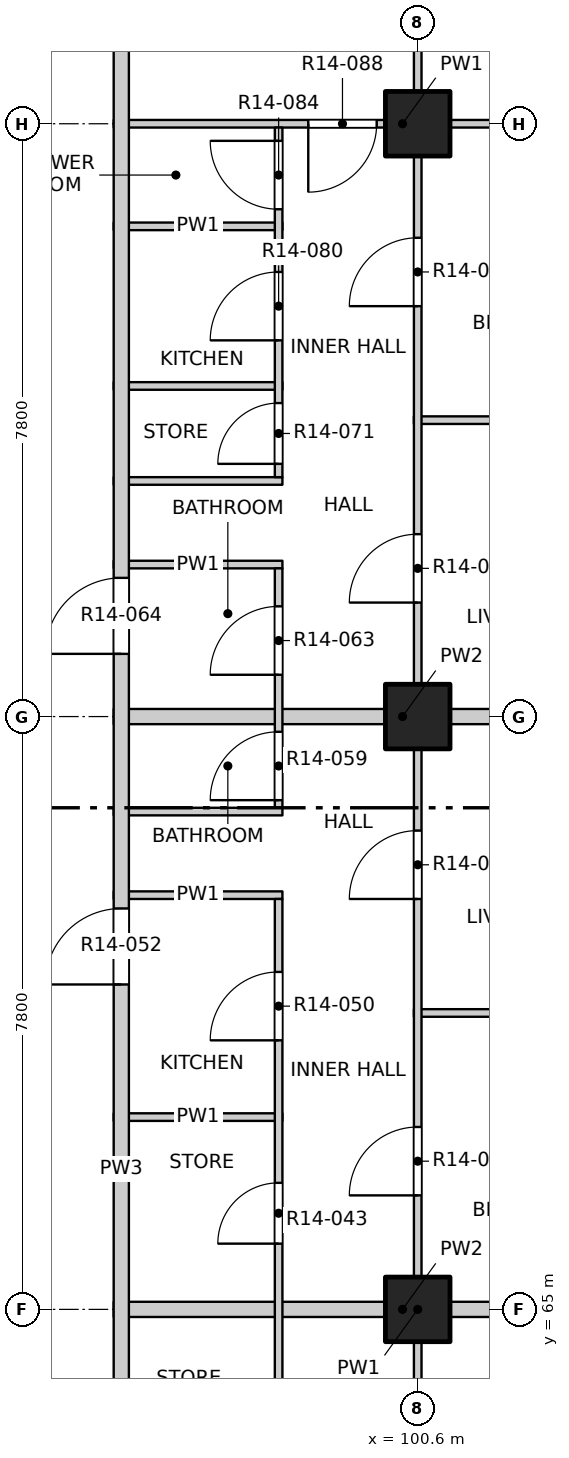
"""IFC4 building model, lengths in metres.
Left out: names, types, materials, properties, quantities, classifications, styles, units other than length and angle.
Written with IfcOpenShell. Run it as: python <this file> out.ifc"""

import sys

from ifc_helpers import new_model, si_unit, direction, frame, frame_2d, origin, origin_2d, place, context, subcontext, project, spatial, rectangle, extrude, element, fill, save


model = new_model("IFC4")
c1 = context("Model", 3, precision=1e-05, world=origin(), true_north=direction((0.0, 1.0)))
c2 = subcontext(c1, "Body", "Model", "MODEL_VIEW")
j1 = project(units=[si_unit("LENGTHUNIT", "METRE"), si_unit("PLANEANGLEUNIT", "RADIAN")], contexts=[c1])
p1 = place(None, origin())
s1 = spatial("IfcSite", under=j1, at=p1, CompositionType="ELEMENT")
p2 = place(p1, origin())
s2 = spatial("IfcBuilding", under=s1, at=p2, CompositionType="ELEMENT")
p3 = place(p2, frame((0.0, 0.0, 155.4)))
s3 = spatial("IfcBuildingStorey", under=s2, at=p3, CompositionType="ELEMENT", Elevation=155.4)
for number, where, z_axis, x_axis in (
    (1, (100.6, 65.0, -0.25), (0.0, 0.0, 1.0), (1.0, 0.0, 0.0)),
    (2, (100.6, 72.8, -0.25), (0.0, 0.0, 1.0), (1.0, 0.0, 0.0)),
    (3, (100.6, 80.6, -0.25), (0.0, 0.0, 1.0), (1.0, 0.0, 0.0)),
):
    element("IfcColumn", number, at=place(p3, frame(where, z_axis=z_axis, x_axis=x_axis)), inside=s3, PredefinedType="COLUMN", context=c2, shape_type="SweptSolid", body=[
        extrude(rectangle(XDim=0.85, YDim=0.85, at=origin_2d()), origin(), (0.0, 0.0, 1.0), 3.4),
    ])
p4 = place(p3, frame((96.6, 65.0, 0.0), z_axis=(0.0, 0.0, 1.0), x_axis=(1.0, 0.0, 0.0)))
e4 = element("IfcWall", 4, at=p4, inside=s3, PredefinedType="PARTITIONING", context=c2, shape_type="SweptSolid", body=[
    extrude(rectangle(XDim=7.6, YDim=0.2, at=frame_2d((3.8, 0.0))), origin(), (0.0, 0.0, 1.0), 3.15),
])
p5 = place(p3, frame((96.6, 67.53, 0.0), z_axis=(0.0, 0.0, 1.0), x_axis=(1.0, 0.0, 0.0)))
e5 = element("IfcWall", 5, at=p5, inside=s3, PredefinedType="PARTITIONING", context=c2, shape_type="SweptSolid", body=[
    extrude(rectangle(XDim=2.22, YDim=0.1, at=frame_2d((1.11, 0.0))), origin(), (0.0, 0.0, 1.0), 3.15),
])
p6 = place(p3, frame((100.55, 68.9, 0.0), z_axis=(0.0, 0.0, 1.0), x_axis=(1.0, 0.0, 0.0)))
e6 = element("IfcWall", 6, at=p6, inside=s3, PredefinedType="PARTITIONING", context=c2, shape_type="SweptSolid", body=[
    extrude(rectangle(XDim=3.65, YDim=0.1, at=frame_2d((1.825, 0.0))), origin(), (0.0, 0.0, 1.0), 2.55),
])
for number, where, z_axis, x_axis in (
    (7, (96.6, 70.45, 0.0), (0.0, 0.0, 1.0), (1.0, 0.0, 0.0)),
    (8, (96.6, 71.55, 0.0), (0.0, 0.0, 1.0), (1.0, 0.0, 0.0)),
):
    element("IfcWall", number, at=place(p3, frame(where, z_axis=z_axis, x_axis=x_axis)), inside=s3, PredefinedType="PARTITIONING", context=c2, shape_type="SweptSolid", body=[
        extrude(rectangle(XDim=2.22, YDim=0.1, at=frame_2d((1.11, 0.0))), origin(), (0.0, 0.0, 1.0), 3.15),
    ])
p7 = place(p3, frame((96.6, 72.8, 0.0), z_axis=(0.0, 0.0, 1.0), x_axis=(1.0, 0.0, 0.0)))
e9 = element("IfcWall", 9, at=p7, inside=s3, PredefinedType="PARTITIONING", context=c2, shape_type="SweptSolid", body=[
    extrude(rectangle(XDim=7.6, YDim=0.2, at=frame_2d((3.8, 0.0))), origin(), (0.0, 0.0, 1.0), 3.15),
])
for number, where, z_axis, x_axis in (
    (10, (96.6, 74.8, 0.0), (0.0, 0.0, 1.0), (1.0, 0.0, 0.0)),
    (11, (96.6, 75.9, 0.0), (0.0, 0.0, 1.0), (1.0, 0.0, 0.0)),
):
    element("IfcWall", number, at=place(p3, frame(where, z_axis=z_axis, x_axis=x_axis)), inside=s3, PredefinedType="PARTITIONING", context=c2, shape_type="SweptSolid", body=[
        extrude(rectangle(XDim=2.22, YDim=0.1, at=frame_2d((1.11, 0.0))), origin(), (0.0, 0.0, 1.0), 3.15),
    ])
p8 = place(p3, frame((100.55, 76.7, 0.0), z_axis=(0.0, 0.0, 1.0), x_axis=(1.0, 0.0, 0.0)))
e12 = element("IfcWall", 12, at=p8, inside=s3, PredefinedType="PARTITIONING", context=c2, shape_type="SweptSolid", body=[
    extrude(rectangle(XDim=3.65, YDim=0.1, at=frame_2d((1.825, 0.0))), origin(), (0.0, 0.0, 1.0), 2.55),
])
for number, where, z_axis, x_axis in (
    (13, (96.6, 77.15, 0.0), (0.0, 0.0, 1.0), (1.0, 0.0, 0.0)),
    (14, (96.6, 79.25, 0.0), (0.0, 0.0, 1.0), (1.0, 0.0, 0.0)),
):
    element("IfcWall", number, at=place(p3, frame(where, z_axis=z_axis, x_axis=x_axis)), inside=s3, PredefinedType="PARTITIONING", context=c2, shape_type="SweptSolid", body=[
        extrude(rectangle(XDim=2.22, YDim=0.1, at=frame_2d((1.11, 0.0))), origin(), (0.0, 0.0, 1.0), 3.15),
    ])
p9 = place(p3, frame((96.6, 80.6, 0.0), z_axis=(0.0, 0.0, 1.0), x_axis=(1.0, 0.0, 0.0)))
e15 = element("IfcWall", 15, at=p9, inside=s3, PredefinedType="PARTITIONING", context=c2, shape_type="SweptSolid", body=[
    extrude(rectangle(XDim=7.6, YDim=0.1, at=frame_2d((3.8, 0.0))), origin(), (0.0, 0.0, 1.0), 3.15),
])
p10 = place(p9, frame((2.56, 0.0, 0.0)))
e16 = element("IfcOpeningElement", 16, at=p10, cuts=e15, PredefinedType="OPENING", context=c2, shape_type="SweptSolid", body=[
    extrude(rectangle(XDim=0.9, YDim=2.1, at=frame_2d((0.45, 1.05))), frame((0.0, 0.06, 0.0), z_axis=(0.0, -1.0, 0.0), x_axis=(1.0, 0.0, 0.0)), (0.0, 0.0, 1.0), 0.12),
])
p11 = place(p3, frame((96.7, 49.5, 0.0), z_axis=(0.0, 0.0, 1.0), x_axis=(0.0, 1.0, 0.0)))
e17 = element("IfcWall", 17, at=p11, inside=s3, PredefinedType="PARTITIONING", context=c2, shape_type="SweptSolid", body=[
    extrude(rectangle(XDim=34.7, YDim=0.2, at=frame_2d((17.35, 0.0))), origin(), (0.0, 0.0, 1.0), 3.15),
])
p12 = place(p11, frame((3.225, 0.0, 0.0)))
e18 = element("IfcOpeningElement", 18, at=p12, cuts=e17, PredefinedType="OPENING", context=c2, shape_type="SweptSolid", body=[
    extrude(rectangle(XDim=1.0, YDim=2.1, at=frame_2d((0.5, 1.05))), frame((0.0, 0.11, 0.0), z_axis=(0.0, -1.0, 0.0), x_axis=(1.0, 0.0, 0.0)), (0.0, 0.0, 1.0), 0.22),
])
p13 = place(p11, frame((19.775, 0.0, 0.0)))
e19 = element("IfcOpeningElement", 19, at=p13, cuts=e17, PredefinedType="OPENING", context=c2, shape_type="SweptSolid", body=[
    extrude(rectangle(XDim=1.0, YDim=2.1, at=frame_2d((0.5, 1.05))), frame((0.0, 0.11, 0.0), z_axis=(0.0, -1.0, 0.0), x_axis=(1.0, 0.0, 0.0)), (0.0, 0.0, 1.0), 0.22),
])
p14 = place(p11, frame((24.125, 0.0, 0.0)))
e20 = element("IfcOpeningElement", 20, at=p14, cuts=e17, PredefinedType="OPENING", context=c2, shape_type="SweptSolid", body=[
    extrude(rectangle(XDim=1.0, YDim=2.1, at=frame_2d((0.5, 1.05))), frame((0.0, 0.11, 0.0), z_axis=(0.0, -1.0, 0.0), x_axis=(1.0, 0.0, 0.0)), (0.0, 0.0, 1.0), 0.22),
])
p15 = place(p3, frame((98.77, 55.05, 0.0), z_axis=(0.0, 0.0, 1.0), x_axis=(0.0, 1.0, 0.0)))
e21 = element("IfcWall", 21, at=p15, inside=s3, PredefinedType="PARTITIONING", context=c2, shape_type="SweptSolid", body=[
    extrude(rectangle(XDim=15.35, YDim=0.1, at=frame_2d((7.675, 0.0))), origin(), (0.0, 0.0, 1.0), 3.15),
])
p16 = place(p15, frame((1.035, 0.0, 0.0)))
e22 = element("IfcOpeningElement", 22, at=p16, cuts=e21, PredefinedType="OPENING", context=c2, shape_type="SweptSolid", body=[
    extrude(rectangle(XDim=0.9, YDim=2.1, at=frame_2d((0.45, 1.05))), frame((0.0, 0.06, 0.0), z_axis=(0.0, -1.0, 0.0), x_axis=(1.0, 0.0, 0.0)), (0.0, 0.0, 1.0), 0.12),
])
p17 = place(p15, frame((3.47, 0.0, 0.0)))
e23 = element("IfcOpeningElement", 23, at=p17, cuts=e21, PredefinedType="OPENING", context=c2, shape_type="SweptSolid", body=[
    extrude(rectangle(XDim=0.9, YDim=2.1, at=frame_2d((0.45, 1.05))), frame((0.0, 0.06, 0.0), z_axis=(0.0, -1.0, 0.0), x_axis=(1.0, 0.0, 0.0)), (0.0, 0.0, 1.0), 0.12),
])
p18 = place(p15, frame((5.645, 0.0, 0.0)))
e24 = element("IfcOpeningElement", 24, at=p18, cuts=e21, PredefinedType="OPENING", context=c2, shape_type="SweptSolid", body=[
    extrude(rectangle(XDim=0.8, YDim=2.1, at=frame_2d((0.4, 1.05))), frame((0.0, 0.06, 0.0), z_axis=(0.0, -1.0, 0.0), x_axis=(1.0, 0.0, 0.0)), (0.0, 0.0, 1.0), 0.12),
])
p19 = place(p15, frame((8.21, 0.0, 0.0)))
e25 = element("IfcOpeningElement", 25, at=p19, cuts=e21, PredefinedType="OPENING", context=c2, shape_type="SweptSolid", body=[
    extrude(rectangle(XDim=0.8, YDim=2.1, at=frame_2d((0.4, 1.05))), frame((0.0, 0.06, 0.0), z_axis=(0.0, -1.0, 0.0), x_axis=(1.0, 0.0, 0.0)), (0.0, 0.0, 1.0), 0.12),
])
p20 = place(p15, frame((10.815, 0.0, 0.0)))
e26 = element("IfcOpeningElement", 26, at=p20, cuts=e21, PredefinedType="OPENING", context=c2, shape_type="SweptSolid", body=[
    extrude(rectangle(XDim=0.8, YDim=2.1, at=frame_2d((0.4, 1.05))), frame((0.0, 0.06, 0.0), z_axis=(0.0, -1.0, 0.0), x_axis=(1.0, 0.0, 0.0)), (0.0, 0.0, 1.0), 0.12),
])
p21 = place(p15, frame((13.49, 0.0, 0.0)))
e27 = element("IfcOpeningElement", 27, at=p21, cuts=e21, PredefinedType="OPENING", context=c2, shape_type="SweptSolid", body=[
    extrude(rectangle(XDim=0.9, YDim=2.1, at=frame_2d((0.45, 1.05))), frame((0.0, 0.06, 0.0), z_axis=(0.0, -1.0, 0.0), x_axis=(1.0, 0.0, 0.0)), (0.0, 0.0, 1.0), 0.12),
])
p22 = place(p3, frame((98.77, 71.6, 0.0), z_axis=(0.0, 0.0, 1.0), x_axis=(0.0, 1.0, 0.0)))
e28 = element("IfcWall", 28, at=p22, inside=s3, PredefinedType="PARTITIONING", context=c2, shape_type="SweptSolid", body=[
    extrude(rectangle(XDim=3.15, YDim=0.1, at=frame_2d((1.575, 0.0))), origin(), (0.0, 0.0, 1.0), 3.15),
])
p23 = place(p22, frame((0.1, 0.0, 0.0)))
e29 = element("IfcOpeningElement", 29, at=p23, cuts=e28, PredefinedType="OPENING", context=c2, shape_type="SweptSolid", body=[
    extrude(rectangle(XDim=0.9, YDim=2.1, at=frame_2d((0.45, 1.05))), frame((0.0, 0.06, 0.0), z_axis=(0.0, -1.0, 0.0), x_axis=(1.0, 0.0, 0.0)), (0.0, 0.0, 1.0), 0.12),
])
p24 = place(p22, frame((1.75, 0.0, 0.0)))
e30 = element("IfcOpeningElement", 30, at=p24, cuts=e28, PredefinedType="OPENING", context=c2, shape_type="SweptSolid", body=[
    extrude(rectangle(XDim=0.9, YDim=2.1, at=frame_2d((0.45, 1.05))), frame((0.0, 0.06, 0.0), z_axis=(0.0, -1.0, 0.0), x_axis=(1.0, 0.0, 0.0)), (0.0, 0.0, 1.0), 0.12),
])
p25 = place(p3, frame((98.77, 75.95, 0.0), z_axis=(0.0, 0.0, 1.0), x_axis=(0.0, 1.0, 0.0)))
e31 = element("IfcWall", 31, at=p25, inside=s3, PredefinedType="PARTITIONING", context=c2, shape_type="SweptSolid", body=[
    extrude(rectangle(XDim=4.6, YDim=0.1, at=frame_2d((2.3, 0.0))), origin(), (0.0, 0.0, 1.0), 3.15),
])
p26 = place(p25, frame((0.175, 0.0, 0.0)))
e32 = element("IfcOpeningElement", 32, at=p26, cuts=e31, PredefinedType="OPENING", context=c2, shape_type="SweptSolid", body=[
    extrude(rectangle(XDim=0.8, YDim=2.1, at=frame_2d((0.4, 1.05))), frame((0.0, 0.06, 0.0), z_axis=(0.0, -1.0, 0.0), x_axis=(1.0, 0.0, 0.0)), (0.0, 0.0, 1.0), 0.12),
])
p27 = place(p25, frame((1.8, 0.0, 0.0)))
e33 = element("IfcOpeningElement", 33, at=p27, cuts=e31, PredefinedType="OPENING", context=c2, shape_type="SweptSolid", body=[
    extrude(rectangle(XDim=0.9, YDim=2.1, at=frame_2d((0.45, 1.05))), frame((0.0, 0.06, 0.0), z_axis=(0.0, -1.0, 0.0), x_axis=(1.0, 0.0, 0.0)), (0.0, 0.0, 1.0), 0.12),
])
p28 = place(p25, frame((3.525, 0.0, 0.0)))
e34 = element("IfcOpeningElement", 34, at=p28, cuts=e31, PredefinedType="OPENING", context=c2, shape_type="SweptSolid", body=[
    extrude(rectangle(XDim=0.9, YDim=2.1, at=frame_2d((0.45, 1.05))), frame((0.0, 0.06, 0.0), z_axis=(0.0, -1.0, 0.0), x_axis=(1.0, 0.0, 0.0)), (0.0, 0.0, 1.0), 0.12),
])
p29 = place(p3, frame((100.6, 45.8, 0.0), z_axis=(0.0, 0.0, 1.0), x_axis=(0.0, 1.0, 0.0)))
e35 = element("IfcWall", 35, at=p29, inside=s3, PredefinedType="PARTITIONING", context=c2, shape_type="SweptSolid", body=[
    extrude(rectangle(XDim=38.4, YDim=0.1, at=frame_2d((19.2, 0.0))), origin(), (0.0, 0.0, 1.0), 3.15),
])
p30 = place(p29, frame((1.05, 0.0, 0.0)))
e36 = element("IfcOpeningElement", 36, at=p30, cuts=e35, PredefinedType="OPENING", context=c2, shape_type="SweptSolid", body=[
    extrude(rectangle(XDim=1.2, YDim=2.1, at=frame_2d((0.6, 1.05))), frame((0.0, 0.06, 0.0), z_axis=(0.0, -1.0, 0.0), x_axis=(1.0, 0.0, 0.0)), (0.0, 0.0, 1.0), 0.12),
])
p31 = place(p29, frame((5.1, 0.0, 0.0)))
e37 = element("IfcOpeningElement", 37, at=p31, cuts=e35, PredefinedType="OPENING", context=c2, shape_type="SweptSolid", body=[
    extrude(rectangle(XDim=0.9, YDim=2.1, at=frame_2d((0.45, 1.05))), frame((0.0, 0.06, 0.0), z_axis=(0.0, -1.0, 0.0), x_axis=(1.0, 0.0, 0.0)), (0.0, 0.0, 1.0), 0.12),
])
p32 = place(p29, frame((9.0, 0.0, 0.0)))
e38 = element("IfcOpeningElement", 38, at=p32, cuts=e35, PredefinedType="OPENING", context=c2, shape_type="SweptSolid", body=[
    extrude(rectangle(XDim=0.9, YDim=2.1, at=frame_2d((0.45, 1.05))), frame((0.0, 0.06, 0.0), z_axis=(0.0, -1.0, 0.0), x_axis=(1.0, 0.0, 0.0)), (0.0, 0.0, 1.0), 0.12),
])
p33 = place(p29, frame((12.9, 0.0, 0.0)))
e39 = element("IfcOpeningElement", 39, at=p33, cuts=e35, PredefinedType="OPENING", context=c2, shape_type="SweptSolid", body=[
    extrude(rectangle(XDim=0.9, YDim=2.1, at=frame_2d((0.45, 1.05))), frame((0.0, 0.06, 0.0), z_axis=(0.0, -1.0, 0.0), x_axis=(1.0, 0.0, 0.0)), (0.0, 0.0, 1.0), 0.12),
])
p34 = place(p29, frame((16.8, 0.0, 0.0)))
e40 = element("IfcOpeningElement", 40, at=p34, cuts=e35, PredefinedType="OPENING", context=c2, shape_type="SweptSolid", body=[
    extrude(rectangle(XDim=0.9, YDim=2.1, at=frame_2d((0.45, 1.05))), frame((0.0, 0.06, 0.0), z_axis=(0.0, -1.0, 0.0), x_axis=(1.0, 0.0, 0.0)), (0.0, 0.0, 1.0), 0.12),
])
p35 = place(p29, frame((20.7, 0.0, 0.0)))
e41 = element("IfcOpeningElement", 41, at=p35, cuts=e35, PredefinedType="OPENING", context=c2, shape_type="SweptSolid", body=[
    extrude(rectangle(XDim=0.9, YDim=2.1, at=frame_2d((0.45, 1.05))), frame((0.0, 0.06, 0.0), z_axis=(0.0, -1.0, 0.0), x_axis=(1.0, 0.0, 0.0)), (0.0, 0.0, 1.0), 0.12),
])
p36 = place(p29, frame((24.6, 0.0, 0.0)))
e42 = element("IfcOpeningElement", 42, at=p36, cuts=e35, PredefinedType="OPENING", context=c2, shape_type="SweptSolid", body=[
    extrude(rectangle(XDim=0.9, YDim=2.1, at=frame_2d((0.45, 1.05))), frame((0.0, 0.06, 0.0), z_axis=(0.0, -1.0, 0.0), x_axis=(1.0, 0.0, 0.0)), (0.0, 0.0, 1.0), 0.12),
])
p37 = place(p29, frame((28.5, 0.0, 0.0)))
e43 = element("IfcOpeningElement", 43, at=p37, cuts=e35, PredefinedType="OPENING", context=c2, shape_type="SweptSolid", body=[
    extrude(rectangle(XDim=0.9, YDim=2.1, at=frame_2d((0.45, 1.05))), frame((0.0, 0.06, 0.0), z_axis=(0.0, -1.0, 0.0), x_axis=(1.0, 0.0, 0.0)), (0.0, 0.0, 1.0), 0.12),
])
p38 = place(p29, frame((32.4, 0.0, 0.0)))
e44 = element("IfcOpeningElement", 44, at=p38, cuts=e35, PredefinedType="OPENING", context=c2, shape_type="SweptSolid", body=[
    extrude(rectangle(XDim=0.9, YDim=2.1, at=frame_2d((0.45, 1.05))), frame((0.0, 0.06, 0.0), z_axis=(0.0, -1.0, 0.0), x_axis=(1.0, 0.0, 0.0)), (0.0, 0.0, 1.0), 0.12),
])
p39 = place(p29, frame((36.15, 0.0, 0.0)))
e45 = element("IfcOpeningElement", 45, at=p39, cuts=e35, PredefinedType="OPENING", context=c2, shape_type="SweptSolid", body=[
    extrude(rectangle(XDim=1.2, YDim=2.1, at=frame_2d((0.6, 1.05))), frame((0.0, 0.06, 0.0), z_axis=(0.0, -1.0, 0.0), x_axis=(1.0, 0.0, 0.0)), (0.0, 0.0, 1.0), 0.12),
])
p40 = place(p20, origin())
e46 = element("IfcDoor", 46, at=p40, inside=s3, OperationType="SINGLE_SWING_LEFT", PredefinedType="DOOR", context=c2, shape_type="SweptSolid", body=[
    extrude(rectangle(XDim=0.8, YDim=2.1, at=frame_2d((0.4, 1.05))), frame((0.0, 0.025, 0.0), z_axis=(0.0, -1.0, 0.0), x_axis=(1.0, 0.0, 0.0)), (0.0, 0.0, 1.0), 0.05),
])
fill(e26, e46)
p41 = place(p35, origin())
e47 = element("IfcDoor", 47, at=p41, inside=s3, OperationType="SINGLE_SWING_LEFT", PredefinedType="DOOR", context=c2, shape_type="SweptSolid", body=[
    extrude(rectangle(XDim=0.9, YDim=2.1, at=frame_2d((0.45, 1.05))), frame((0.0, 0.025, 0.0), z_axis=(0.0, -1.0, 0.0), x_axis=(1.0, 0.0, 0.0)), (0.0, 0.0, 1.0), 0.05),
])
fill(e41, e47)
p42 = place(p21, origin())
e48 = element("IfcDoor", 48, at=p42, inside=s3, OperationType="SINGLE_SWING_LEFT", PredefinedType="DOOR", context=c2, shape_type="SweptSolid", body=[
    extrude(rectangle(XDim=0.9, YDim=2.1, at=frame_2d((0.45, 1.05))), frame((0.0, 0.025, 0.0), z_axis=(0.0, -1.0, 0.0), x_axis=(1.0, 0.0, 0.0)), (0.0, 0.0, 1.0), 0.05),
])
fill(e27, e48)
p43 = place(p13, origin())
e49 = element("IfcDoor", 49, at=p43, inside=s3, OperationType="SINGLE_SWING_RIGHT", PredefinedType="DOOR", context=c2, shape_type="SweptSolid", body=[
    extrude(rectangle(XDim=1.0, YDim=2.1, at=frame_2d((0.5, 1.05))), frame((0.0, 0.025, 0.0), z_axis=(0.0, -1.0, 0.0), x_axis=(1.0, 0.0, 0.0)), (0.0, 0.0, 1.0), 0.05),
])
fill(e19, e49)
p44 = place(p36, origin())
e50 = element("IfcDoor", 50, at=p44, inside=s3, OperationType="SINGLE_SWING_LEFT", PredefinedType="DOOR", context=c2, shape_type="SweptSolid", body=[
    extrude(rectangle(XDim=0.9, YDim=2.1, at=frame_2d((0.45, 1.05))), frame((0.0, 0.025, 0.0), z_axis=(0.0, -1.0, 0.0), x_axis=(1.0, 0.0, 0.0)), (0.0, 0.0, 1.0), 0.05),
])
fill(e42, e50)
p45 = place(p23, origin())
e51 = element("IfcDoor", 51, at=p45, inside=s3, OperationType="SINGLE_SWING_LEFT", PredefinedType="DOOR", context=c2, shape_type="SweptSolid", body=[
    extrude(rectangle(XDim=0.9, YDim=2.1, at=frame_2d((0.45, 1.05))), frame((0.0, 0.025, 0.0), z_axis=(0.0, -1.0, 0.0), x_axis=(1.0, 0.0, 0.0)), (0.0, 0.0, 1.0), 0.05),
])
fill(e29, e51)
p46 = place(p24, origin())
e52 = element("IfcDoor", 52, at=p46, inside=s3, OperationType="SINGLE_SWING_LEFT", PredefinedType="DOOR", context=c2, shape_type="SweptSolid", body=[
    extrude(rectangle(XDim=0.9, YDim=2.1, at=frame_2d((0.45, 1.05))), frame((0.0, 0.025, 0.0), z_axis=(0.0, -1.0, 0.0), x_axis=(1.0, 0.0, 0.0)), (0.0, 0.0, 1.0), 0.05),
])
fill(e30, e52)
p47 = place(p14, origin())
e53 = element("IfcDoor", 53, at=p47, inside=s3, OperationType="SINGLE_SWING_RIGHT", PredefinedType="DOOR", context=c2, shape_type="SweptSolid", body=[
    extrude(rectangle(XDim=1.0, YDim=2.1, at=frame_2d((0.5, 1.05))), frame((0.0, 0.025, 0.0), z_axis=(0.0, -1.0, 0.0), x_axis=(1.0, 0.0, 0.0)), (0.0, 0.0, 1.0), 0.05),
])
fill(e20, e53)
p48 = place(p37, origin())
e54 = element("IfcDoor", 54, at=p48, inside=s3, OperationType="SINGLE_SWING_LEFT", PredefinedType="DOOR", context=c2, shape_type="SweptSolid", body=[
    extrude(rectangle(XDim=0.9, YDim=2.1, at=frame_2d((0.45, 1.05))), frame((0.0, 0.025, 0.0), z_axis=(0.0, -1.0, 0.0), x_axis=(1.0, 0.0, 0.0)), (0.0, 0.0, 1.0), 0.05),
])
fill(e43, e54)
p49 = place(p26, origin())
e55 = element("IfcDoor", 55, at=p49, inside=s3, OperationType="SINGLE_SWING_LEFT", PredefinedType="DOOR", context=c2, shape_type="SweptSolid", body=[
    extrude(rectangle(XDim=0.8, YDim=2.1, at=frame_2d((0.4, 1.05))), frame((0.0, 0.025, 0.0), z_axis=(0.0, -1.0, 0.0), x_axis=(1.0, 0.0, 0.0)), (0.0, 0.0, 1.0), 0.05),
])
fill(e32, e55)
p50 = place(p27, origin())
e56 = element("IfcDoor", 56, at=p50, inside=s3, OperationType="SINGLE_SWING_LEFT", PredefinedType="DOOR", context=c2, shape_type="SweptSolid", body=[
    extrude(rectangle(XDim=0.9, YDim=2.1, at=frame_2d((0.45, 1.05))), frame((0.0, 0.025, 0.0), z_axis=(0.0, -1.0, 0.0), x_axis=(1.0, 0.0, 0.0)), (0.0, 0.0, 1.0), 0.05),
])
fill(e33, e56)
p51 = place(p38, origin())
e57 = element("IfcDoor", 57, at=p51, inside=s3, OperationType="SINGLE_SWING_LEFT", PredefinedType="DOOR", context=c2, shape_type="SweptSolid", body=[
    extrude(rectangle(XDim=0.9, YDim=2.1, at=frame_2d((0.45, 1.05))), frame((0.0, 0.025, 0.0), z_axis=(0.0, -1.0, 0.0), x_axis=(1.0, 0.0, 0.0)), (0.0, 0.0, 1.0), 0.05),
])
fill(e44, e57)
p52 = place(p28, origin())
e58 = element("IfcDoor", 58, at=p52, inside=s3, OperationType="SINGLE_SWING_RIGHT", PredefinedType="DOOR", context=c2, shape_type="SweptSolid", body=[
    extrude(rectangle(XDim=0.9, YDim=2.1, at=frame_2d((0.45, 1.05))), frame((0.0, 0.025, 0.0), z_axis=(0.0, -1.0, 0.0), x_axis=(1.0, 0.0, 0.0)), (0.0, 0.0, 1.0), 0.05),
])
fill(e34, e58)
p53 = place(p10, origin())
e59 = element("IfcDoor", 59, at=p53, inside=s3, OperationType="SINGLE_SWING_RIGHT", PredefinedType="DOOR", context=c2, shape_type="SweptSolid", body=[
    extrude(rectangle(XDim=0.9, YDim=2.1, at=frame_2d((0.45, 1.05))), frame((0.0, 0.025, 0.0), z_axis=(0.0, -1.0, 0.0), x_axis=(1.0, 0.0, 0.0)), (0.0, 0.0, 1.0), 0.05),
])
fill(e16, e59)
save(model, sys.argv[1])
